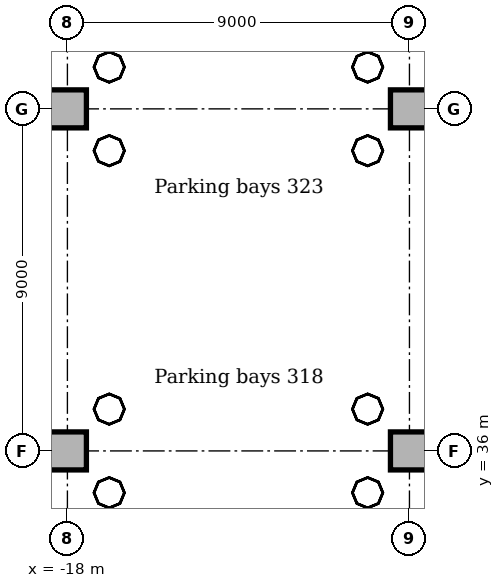
"""IFC4 building model, lengths in metres.
Left out: names, types, materials, properties, quantities, classifications, styles, units other than length and angle.
Written with IfcOpenShell. Run it as: python <this file> out.ifc"""

import sys

from ifc_helpers import new_model, si_unit, direction, frame, origin, origin_2d, place, context, subcontext, project, spatial, rectangle, extrude, element, save


model = new_model("IFC4")
c1 = context("Model", 3, precision=1e-05, world=origin(), true_north=direction((0.0, 1.0)))
c2 = subcontext(c1, "Body", "Model", "MODEL_VIEW")
j1 = project(units=[si_unit("LENGTHUNIT", "METRE"), si_unit("PLANEANGLEUNIT", "RADIAN")], contexts=[c1])
p1 = place(None, origin())
s1 = spatial("IfcSite", under=j1, at=p1, CompositionType="ELEMENT")
p2 = place(p1, origin())
s2 = spatial("IfcBuilding", under=s1, at=p2, CompositionType="ELEMENT")
p3 = place(p2, frame((0.0, 0.0, -14.0)))
s3 = spatial("IfcBuildingStorey", under=s2, at=p3, CompositionType="ELEMENT", Elevation=-14.0)
for number, where, z_axis, x_axis in (
    (1, (-18.0, 36.0, 0.0), (0.0, 0.0, 1.0), (1.0, 0.0, 0.0)),
    (2, (-18.0, 45.0, 0.0), (0.0, 0.0, 1.0), (1.0, 0.0, 0.0)),
    (3, (-9.0, 36.0, 0.0), (0.0, 0.0, 1.0), (1.0, 0.0, 0.0)),
    (4, (-9.0, 45.0, 0.0), (0.0, 0.0, 1.0), (1.0, 0.0, 0.0)),
):
    element("IfcColumn", number, at=place(p3, frame(where, z_axis=z_axis, x_axis=x_axis)), inside=s3, PredefinedType="COLUMN", context=c2, shape_type="SweptSolid", body=[
        extrude(rectangle(XDim=1.0, YDim=1.0, at=origin_2d()), origin(), (0.0, 0.0, 1.0), 4.15),
    ])
save(model, sys.argv[1])
